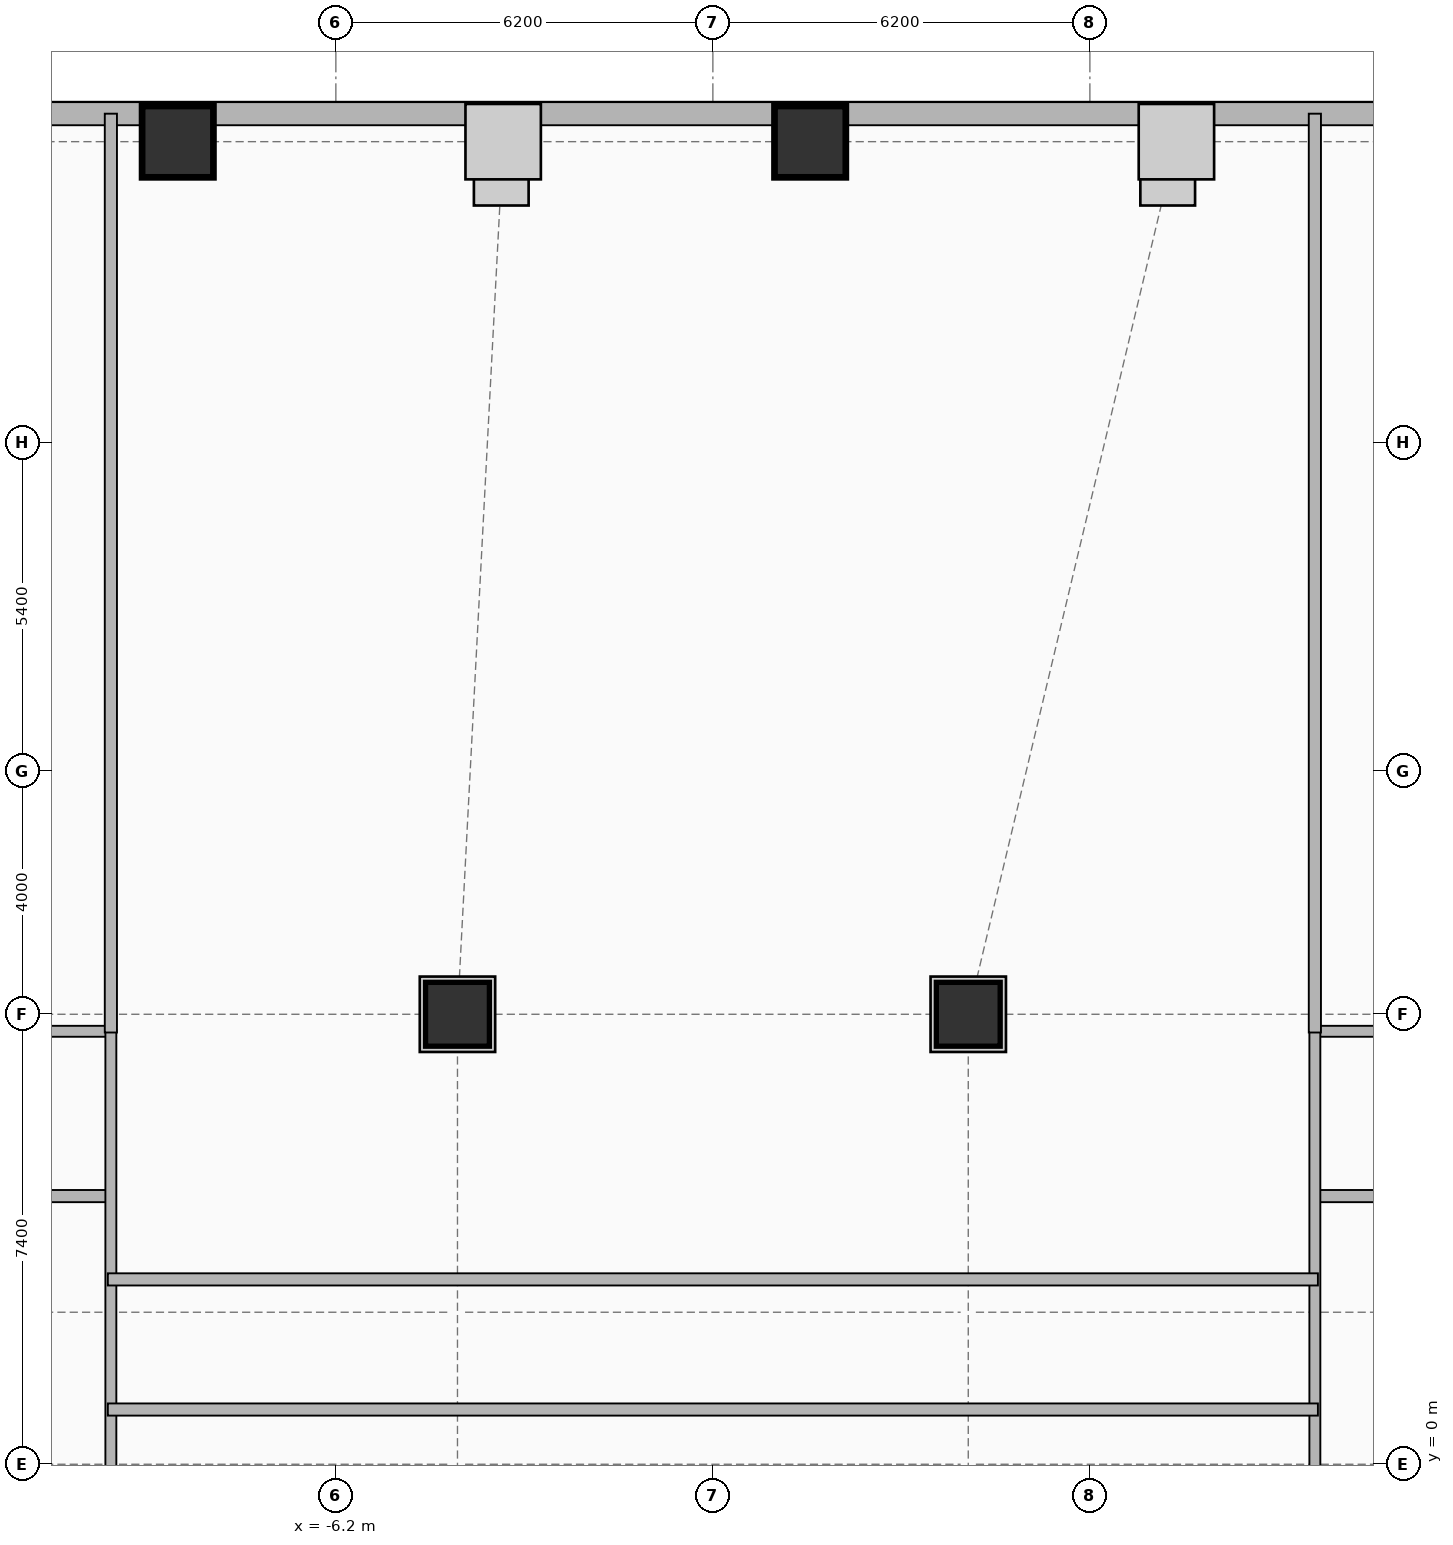
"""IFC4 building model, lengths in metres.
Left out: names, types, materials, properties, quantities, classifications, styles, units other than length and angle.
Written with IfcOpenShell. Run it as: python <this file> out.ifc"""

import sys

from ifc_helpers import new_model, si_unit, direction, frame, frame_2d, origin, origin_2d, place, context, subcontext, project, spatial, rectangle, hollow_rectangle, extrude, element, fill, save


model = new_model("IFC4")
c1 = context("Model", 3, precision=1e-05, world=origin(), true_north=direction((0.0, 1.0)))
c2 = subcontext(c1, "Body", "Model", "MODEL_VIEW")
j1 = project(units=[si_unit("LENGTHUNIT", "METRE"), si_unit("PLANEANGLEUNIT", "RADIAN")], contexts=[c1])
p1 = place(None, origin())
s1 = spatial("IfcSite", under=j1, at=p1, CompositionType="ELEMENT")
p2 = place(p1, origin())
s2 = spatial("IfcBuilding", under=s1, at=p2, CompositionType="ELEMENT")
p3 = place(p2, frame((0.0, 0.0, 80.6)))
s3 = spatial("IfcBuildingStorey", under=s2, at=p3, CompositionType="ELEMENT", Elevation=80.6)
for number, where, z_axis, x_axis in (
    (1, (-4.2, 7.4, 0.0), (0.0, 0.0, 1.0), (1.0, 0.0, 0.0)),
    (2, (4.2, 7.4, 0.0), (0.0, 0.0, 1.0), (1.0, 0.0, 0.0)),
):
    element("IfcColumn", number, at=place(p3, frame(where, z_axis=z_axis, x_axis=x_axis)), inside=s3, PredefinedType="COLUMN", context=c2, shape_type="SweptSolid", body=[
        extrude(rectangle(XDim=1.05, YDim=1.05, at=origin_2d()), origin(), (0.0, 0.0, 1.0), 5.2),
    ])
for number, where, z_axis, x_axis in (
    (3, (1.6, 21.75, 0.0), (0.0, 0.0, 1.0), (1.0, 0.0, 0.0)),
    (4, (-8.8, 21.75, 0.0), (0.0, 0.0, 1.0), (1.0, 0.0, 0.0)),
):
    element("IfcColumn", number, at=place(p3, frame(where, z_axis=z_axis, x_axis=x_axis)), inside=s3, PredefinedType="COLUMN", context=c2, shape_type="SweptSolid", body=[
        extrude(hollow_rectangle(XDim=1.15, YDim=1.15, WallThickness=0.04, at=origin_2d()), origin(), (0.0, 0.0, 1.0), 5.165),
    ])
p4 = place(p3, frame((-29.581, 22.21, 0.0), z_axis=(0.0, 0.0, 1.0), x_axis=(1.0, 0.0, 0.0)))
e5 = element("IfcWall", 5, at=p4, inside=s3, PredefinedType="ELEMENTEDWALL", context=c2, shape_type="SweptSolid", body=[
    extrude(rectangle(XDim=51.963, YDim=0.38, at=frame_2d((25.981, 0.0))), origin(), (0.0, 0.0, 1.0), 3.69),
])
p5 = place(p4, frame((1.365, 0.0, 0.75)))
e6 = element("IfcOpeningElement", 6, at=p5, cuts=e5, PredefinedType="OPENING", context=c2, shape_type="SweptSolid", body=[
    extrude(rectangle(XDim=1.6, YDim=1.4, at=frame_2d((0.8, 0.7))), frame((0.0, 0.2, 0.0), z_axis=(0.0, -1.0, 0.0), x_axis=(1.0, 0.0, 0.0)), (0.0, 0.0, 1.0), 0.4),
])
p6 = place(p4, frame((5.695, 0.0, 0.75)))
e7 = element("IfcOpeningElement", 7, at=p6, cuts=e5, PredefinedType="OPENING", context=c2, shape_type="SweptSolid", body=[
    extrude(rectangle(XDim=1.6, YDim=1.4, at=frame_2d((0.8, 0.7))), frame((0.0, 0.2, 0.0), z_axis=(0.0, -1.0, 0.0), x_axis=(1.0, 0.0, 0.0)), (0.0, 0.0, 1.0), 0.4),
])
p7 = place(p4, frame((14.356, 0.0, 0.75)))
e8 = element("IfcOpeningElement", 8, at=p7, cuts=e5, PredefinedType="OPENING", context=c2, shape_type="SweptSolid", body=[
    extrude(rectangle(XDim=1.6, YDim=1.4, at=frame_2d((0.8, 0.7))), frame((0.0, 0.2, 0.0), z_axis=(0.0, -1.0, 0.0), x_axis=(1.0, 0.0, 0.0)), (0.0, 0.0, 1.0), 0.4),
])
p8 = place(p4, frame((23.016, 0.0, 0.75)))
e9 = element("IfcOpeningElement", 9, at=p8, cuts=e5, PredefinedType="OPENING", context=c2, shape_type="SweptSolid", body=[
    extrude(rectangle(XDim=1.6, YDim=1.4, at=frame_2d((0.8, 0.7))), frame((0.0, 0.2, 0.0), z_axis=(0.0, -1.0, 0.0), x_axis=(1.0, 0.0, 0.0)), (0.0, 0.0, 1.0), 0.4),
])
p9 = place(p4, frame((27.346, 0.0, 0.75)))
e10 = element("IfcOpeningElement", 10, at=p9, cuts=e5, PredefinedType="OPENING", context=c2, shape_type="SweptSolid", body=[
    extrude(rectangle(XDim=1.6, YDim=1.4, at=frame_2d((0.8, 0.7))), frame((0.0, 0.2, 0.0), z_axis=(0.0, -1.0, 0.0), x_axis=(1.0, 0.0, 0.0)), (0.0, 0.0, 1.0), 0.4),
])
p10 = place(p4, frame((36.007, 0.0, 0.75)))
e11 = element("IfcOpeningElement", 11, at=p10, cuts=e5, PredefinedType="OPENING", context=c2, shape_type="SweptSolid", body=[
    extrude(rectangle(XDim=1.6, YDim=1.4, at=frame_2d((0.8, 0.7))), frame((0.0, 0.2, 0.0), z_axis=(0.0, -1.0, 0.0), x_axis=(1.0, 0.0, 0.0)), (0.0, 0.0, 1.0), 0.4),
])
p11 = place(p4, frame((44.667, 0.0, 0.75)))
e12 = element("IfcOpeningElement", 12, at=p11, cuts=e5, PredefinedType="OPENING", context=c2, shape_type="SweptSolid", body=[
    extrude(rectangle(XDim=1.6, YDim=1.4, at=frame_2d((0.8, 0.7))), frame((0.0, 0.2, 0.0), z_axis=(0.0, -1.0, 0.0), x_axis=(1.0, 0.0, 0.0)), (0.0, 0.0, 1.0), 0.4),
])
p12 = place(p4, frame((48.998, 0.0, 0.75)))
e13 = element("IfcOpeningElement", 13, at=p12, cuts=e5, PredefinedType="OPENING", context=c2, shape_type="SweptSolid", body=[
    extrude(rectangle(XDim=1.6, YDim=1.4, at=frame_2d((0.8, 0.7))), frame((0.0, 0.2, 0.0), z_axis=(0.0, -1.0, 0.0), x_axis=(1.0, 0.0, 0.0)), (0.0, 0.0, 1.0), 0.4),
])
p13 = place(p3, frame((-12.15, 4.41, 0.0), z_axis=(0.0, 0.0, 1.0), x_axis=(1.0, 0.0, 0.0)))
e14 = element("IfcWall", 14, at=p13, inside=s3, PredefinedType="PARTITIONING", context=c2, shape_type="SweptSolid", body=[
    extrude(rectangle(XDim=2.27, YDim=0.2, at=frame_2d((1.135, 0.0))), origin(), (0.0, 0.0, 1.0), 4.8),
])
p14 = place(p13, frame((0.685, 0.0, 0.0)))
e15 = element("IfcOpeningElement", 15, at=p14, cuts=e14, PredefinedType="OPENING", context=c2, shape_type="SweptSolid", body=[
    extrude(rectangle(XDim=0.9, YDim=2.05, at=frame_2d((0.45, 1.025))), frame((0.0, 0.11, 0.0), z_axis=(0.0, -1.0, 0.0), x_axis=(1.0, 0.0, 0.0)), (0.0, 0.0, 1.0), 0.22),
])
p15 = place(p3, frame((-12.15, 7.12, 0.0), z_axis=(0.0, 0.0, 1.0), x_axis=(1.0, 0.0, 0.0)))
e16 = element("IfcWall", 16, at=p15, inside=s3, PredefinedType="PARTITIONING", context=c2, shape_type="SweptSolid", body=[
    extrude(rectangle(XDim=2.27, YDim=0.18, at=frame_2d((1.135, 0.0))), origin(), (0.0, 0.0, 1.0), 3.84),
])
p16 = place(p3, frame((9.88, 4.41, 0.0), z_axis=(0.0, 0.0, 1.0), x_axis=(1.0, 0.0, 0.0)))
e17 = element("IfcWall", 17, at=p16, inside=s3, PredefinedType="PARTITIONING", context=c2, shape_type="SweptSolid", body=[
    extrude(rectangle(XDim=2.27, YDim=0.2, at=frame_2d((1.135, 0.0))), origin(), (0.0, 0.0, 1.0), 4.8),
])
p17 = place(p16, frame((0.685, 0.0, 0.0)))
e18 = element("IfcOpeningElement", 18, at=p17, cuts=e17, PredefinedType="OPENING", context=c2, shape_type="SweptSolid", body=[
    extrude(rectangle(XDim=0.9, YDim=2.05, at=frame_2d((0.45, 1.025))), frame((0.0, 0.11, 0.0), z_axis=(0.0, -1.0, 0.0), x_axis=(1.0, 0.0, 0.0)), (0.0, 0.0, 1.0), 0.22),
])
p18 = place(p3, frame((9.88, 7.12, 0.0), z_axis=(0.0, 0.0, 1.0), x_axis=(1.0, 0.0, 0.0)))
e19 = element("IfcWall", 19, at=p18, inside=s3, PredefinedType="PARTITIONING", context=c2, shape_type="SweptSolid", body=[
    extrude(rectangle(XDim=2.27, YDim=0.18, at=frame_2d((1.135, 0.0))), origin(), (0.0, 0.0, 1.0), 3.84),
])
p19 = place(p3, frame((-9.9, -7.14, 0.0), z_axis=(0.0, 0.0, 1.0), x_axis=(0.0, 1.0, 0.0)))
e20 = element("IfcWall", 20, at=p19, inside=s3, PredefinedType="PARTITIONING", context=c2, shape_type="SweptSolid", body=[
    extrude(rectangle(XDim=14.28, YDim=0.18, at=frame_2d((7.14, 0.0))), origin(), (0.0, 0.0, 1.0), 4.8),
])
p20 = place(p19, frame((8.689, 0.0, 0.0)))
e21 = element("IfcOpeningElement", 21, at=p20, cuts=e20, PredefinedType="OPENING", context=c2, shape_type="SweptSolid", body=[
    extrude(rectangle(XDim=0.9, YDim=2.05, at=frame_2d((0.45, 1.025))), frame((0.0, 0.1, 0.0), z_axis=(0.0, -1.0, 0.0), x_axis=(1.0, 0.0, 0.0)), (0.0, 0.0, 1.0), 0.2),
])
p21 = place(p3, frame((9.9, -7.14, 0.0), z_axis=(0.0, 0.0, 1.0), x_axis=(0.0, 1.0, 0.0)))
e22 = element("IfcWall", 22, at=p21, inside=s3, PredefinedType="PARTITIONING", context=c2, shape_type="SweptSolid", body=[
    extrude(rectangle(XDim=14.28, YDim=0.18, at=frame_2d((7.14, 0.0))), origin(), (0.0, 0.0, 1.0), 4.8),
])
p22 = place(p21, frame((8.689, 0.0, 0.0)))
e23 = element("IfcOpeningElement", 23, at=p22, cuts=e22, PredefinedType="OPENING", context=c2, shape_type="SweptSolid", body=[
    extrude(rectangle(XDim=0.9, YDim=2.05, at=frame_2d((0.45, 1.025))), frame((0.0, 0.1, 0.0), z_axis=(0.0, -1.0, 0.0), x_axis=(1.0, 0.0, 0.0)), (0.0, 0.0, 1.0), 0.2),
])
p23 = place(p3, frame((-9.95, 3.04, 0.0), z_axis=(0.0, 0.0, 1.0), x_axis=(1.0, 0.0, 0.0)))
e24 = element("IfcWall", 24, at=p23, inside=s3, PredefinedType="PARTITIONING", context=c2, shape_type="SweptSolid", body=[
    extrude(rectangle(XDim=19.9, YDim=0.2, at=frame_2d((9.95, 0.0))), origin(), (0.0, 0.0, 1.0), 4.8),
])
p24 = place(p23, frame((9.425, 0.0, 0.0)))
e25 = element("IfcOpeningElement", 25, at=p24, cuts=e24, PredefinedType="OPENING", context=c2, shape_type="SweptSolid", body=[
    extrude(rectangle(XDim=1.05, YDim=2.05, at=frame_2d((0.525, 1.025))), frame((0.0, 0.11, 0.0), z_axis=(0.0, -1.0, 0.0), x_axis=(1.0, 0.0, 0.0)), (0.0, 0.0, 1.0), 0.22),
])
p25 = place(p3, frame((-9.95, 0.9, 0.0), z_axis=(0.0, 0.0, 1.0), x_axis=(1.0, 0.0, 0.0)))
e26 = element("IfcWall", 26, at=p25, inside=s3, PredefinedType="PARTITIONING", context=c2, shape_type="SweptSolid", body=[
    extrude(rectangle(XDim=19.9, YDim=0.2, at=frame_2d((9.95, 0.0))), origin(), (0.0, 0.0, 1.0), 4.8),
])
p26 = place(p25, frame((9.425, 0.0, 0.0)))
e27 = element("IfcOpeningElement", 27, at=p26, cuts=e26, PredefinedType="OPENING", context=c2, shape_type="SweptSolid", body=[
    extrude(rectangle(XDim=1.05, YDim=2.05, at=frame_2d((0.525, 1.025))), frame((0.0, 0.11, 0.0), z_axis=(0.0, -1.0, 0.0), x_axis=(1.0, 0.0, 0.0)), (0.0, 0.0, 1.0), 0.22),
])
p27 = place(p3, frame((-9.9, 7.1, 0.0), z_axis=(0.0, 0.0, 1.0), x_axis=(0.0, 1.0, 0.0)))
e28 = element("IfcWall", 28, at=p27, inside=s3, PredefinedType="PARTITIONING", context=c2, shape_type="SweptSolid", body=[
    extrude(rectangle(XDim=15.11, YDim=0.2, at=frame_2d((7.555, 0.0))), origin(), (0.0, 0.0, 1.0), 4.8),
])
p28 = place(p27, frame((8.239, 0.0, 0.0)))
e29 = element("IfcOpeningElement", 29, at=p28, cuts=e28, PredefinedType="OPENING", context=c2, shape_type="SweptSolid", body=[
    extrude(rectangle(XDim=1.05, YDim=2.05, at=frame_2d((0.525, 1.025))), frame((0.0, 0.11, 0.0), z_axis=(0.0, -1.0, 0.0), x_axis=(1.0, 0.0, 0.0)), (0.0, 0.0, 1.0), 0.22),
])
p29 = place(p3, frame((9.9, 7.1, 0.0), z_axis=(0.0, 0.0, 1.0), x_axis=(0.0, 1.0, 0.0)))
e30 = element("IfcWall", 30, at=p29, inside=s3, PredefinedType="PARTITIONING", context=c2, shape_type="SweptSolid", body=[
    extrude(rectangle(XDim=15.11, YDim=0.2, at=frame_2d((7.555, 0.0))), origin(), (0.0, 0.0, 1.0), 4.8),
])
p30 = place(p29, frame((8.239, 0.0, 0.0)))
e31 = element("IfcOpeningElement", 31, at=p30, cuts=e30, PredefinedType="OPENING", context=c2, shape_type="SweptSolid", body=[
    extrude(rectangle(XDim=1.05, YDim=2.05, at=frame_2d((0.525, 1.025))), frame((0.0, 0.11, 0.0), z_axis=(0.0, -1.0, 0.0), x_axis=(1.0, 0.0, 0.0)), (0.0, 0.0, 1.0), 0.22),
])
p31 = place(p8, origin())
e32 = element("IfcWindow", 32, at=p31, inside=s3, PartitioningType="SINGLE_PANEL", PredefinedType="WINDOW", context=c2, shape_type="SweptSolid", body=[
    extrude(rectangle(XDim=1.6, YDim=1.4, at=frame_2d((0.8, 0.7))), frame((0.0, 0.03, 0.0), z_axis=(0.0, -1.0, 0.0), x_axis=(1.0, 0.0, 0.0)), (0.0, 0.0, 1.0), 0.06),
])
fill(e9, e32)
p32 = place(p9, origin())
e33 = element("IfcWindow", 33, at=p32, inside=s3, PartitioningType="SINGLE_PANEL", PredefinedType="WINDOW", context=c2, shape_type="SweptSolid", body=[
    extrude(rectangle(XDim=1.6, YDim=1.4, at=frame_2d((0.8, 0.7))), frame((0.0, 0.03, 0.0), z_axis=(0.0, -1.0, 0.0), x_axis=(1.0, 0.0, 0.0)), (0.0, 0.0, 1.0), 0.06),
])
fill(e10, e33)
p33 = place(p10, origin())
e34 = element("IfcWindow", 34, at=p33, inside=s3, PartitioningType="SINGLE_PANEL", PredefinedType="WINDOW", context=c2, shape_type="SweptSolid", body=[
    extrude(rectangle(XDim=1.6, YDim=1.4, at=frame_2d((0.8, 0.7))), frame((0.0, 0.03, 0.0), z_axis=(0.0, -1.0, 0.0), x_axis=(1.0, 0.0, 0.0)), (0.0, 0.0, 1.0), 0.06),
])
fill(e11, e34)
p34 = place(p14, origin())
e35 = element("IfcDoor", 35, at=p34, inside=s3, OperationType="SINGLE_SWING_LEFT", PredefinedType="DOOR", context=c2, shape_type="SweptSolid", body=[
    extrude(rectangle(XDim=0.9, YDim=2.05, at=frame_2d((0.45, 1.025))), frame((0.0, 0.025, 0.0), z_axis=(0.0, -1.0, 0.0), x_axis=(1.0, 0.0, 0.0)), (0.0, 0.0, 1.0), 0.05),
])
fill(e15, e35)
p35 = place(p17, origin())
e36 = element("IfcDoor", 36, at=p35, inside=s3, OperationType="SINGLE_SWING_RIGHT", PredefinedType="DOOR", context=c2, shape_type="SweptSolid", body=[
    extrude(rectangle(XDim=0.9, YDim=2.05, at=frame_2d((0.45, 1.025))), frame((0.0, 0.025, 0.0), z_axis=(0.0, -1.0, 0.0), x_axis=(1.0, 0.0, 0.0)), (0.0, 0.0, 1.0), 0.05),
])
fill(e18, e36)
p36 = place(p20, origin())
e37 = element("IfcDoor", 37, at=p36, inside=s3, OperationType="SINGLE_SWING_LEFT", PredefinedType="DOOR", context=c2, shape_type="SweptSolid", body=[
    extrude(rectangle(XDim=0.9, YDim=2.05, at=frame_2d((0.45, 1.025))), frame((0.0, 0.025, 0.0), z_axis=(0.0, -1.0, 0.0), x_axis=(1.0, 0.0, 0.0)), (0.0, 0.0, 1.0), 0.05),
])
fill(e21, e37)
p37 = place(p22, origin())
e38 = element("IfcDoor", 38, at=p37, inside=s3, OperationType="SINGLE_SWING_RIGHT", PredefinedType="DOOR", context=c2, shape_type="SweptSolid", body=[
    extrude(rectangle(XDim=0.9, YDim=2.05, at=frame_2d((0.45, 1.025))), frame((0.0, 0.025, 0.0), z_axis=(0.0, -1.0, 0.0), x_axis=(1.0, 0.0, 0.0)), (0.0, 0.0, 1.0), 0.05),
])
fill(e23, e38)
p38 = place(p24, origin())
e39 = element("IfcDoor", 39, at=p38, inside=s3, OperationType="SINGLE_SWING_LEFT", PredefinedType="DOOR", context=c2, shape_type="SweptSolid", body=[
    extrude(rectangle(XDim=1.05, YDim=2.05, at=frame_2d((0.525, 1.025))), frame((0.0, 0.025, 0.0), z_axis=(0.0, -1.0, 0.0), x_axis=(1.0, 0.0, 0.0)), (0.0, 0.0, 1.0), 0.05),
])
fill(e25, e39)
p39 = place(p26, origin())
e40 = element("IfcDoor", 40, at=p39, inside=s3, OperationType="SINGLE_SWING_RIGHT", PredefinedType="DOOR", context=c2, shape_type="SweptSolid", body=[
    extrude(rectangle(XDim=1.05, YDim=2.05, at=frame_2d((0.525, 1.025))), frame((0.0, 0.025, 0.0), z_axis=(0.0, -1.0, 0.0), x_axis=(1.0, 0.0, 0.0)), (0.0, 0.0, 1.0), 0.05),
])
fill(e27, e40)
p40 = place(p28, origin())
e41 = element("IfcDoor", 41, at=p40, inside=s3, OperationType="SINGLE_SWING_LEFT", PredefinedType="DOOR", context=c2, shape_type="SweptSolid", body=[
    extrude(rectangle(XDim=1.05, YDim=2.05, at=frame_2d((0.525, 1.025))), frame((0.0, 0.025, 0.0), z_axis=(0.0, -1.0, 0.0), x_axis=(1.0, 0.0, 0.0)), (0.0, 0.0, 1.0), 0.05),
])
fill(e29, e41)
p41 = place(p30, origin())
e42 = element("IfcDoor", 42, at=p41, inside=s3, OperationType="SINGLE_SWING_RIGHT", PredefinedType="DOOR", context=c2, shape_type="SweptSolid", body=[
    extrude(rectangle(XDim=1.05, YDim=2.05, at=frame_2d((0.525, 1.025))), frame((0.0, 0.025, 0.0), z_axis=(0.0, -1.0, 0.0), x_axis=(1.0, 0.0, 0.0)), (0.0, 0.0, 1.0), 0.05),
])
fill(e31, e42)
save(model, sys.argv[1])
